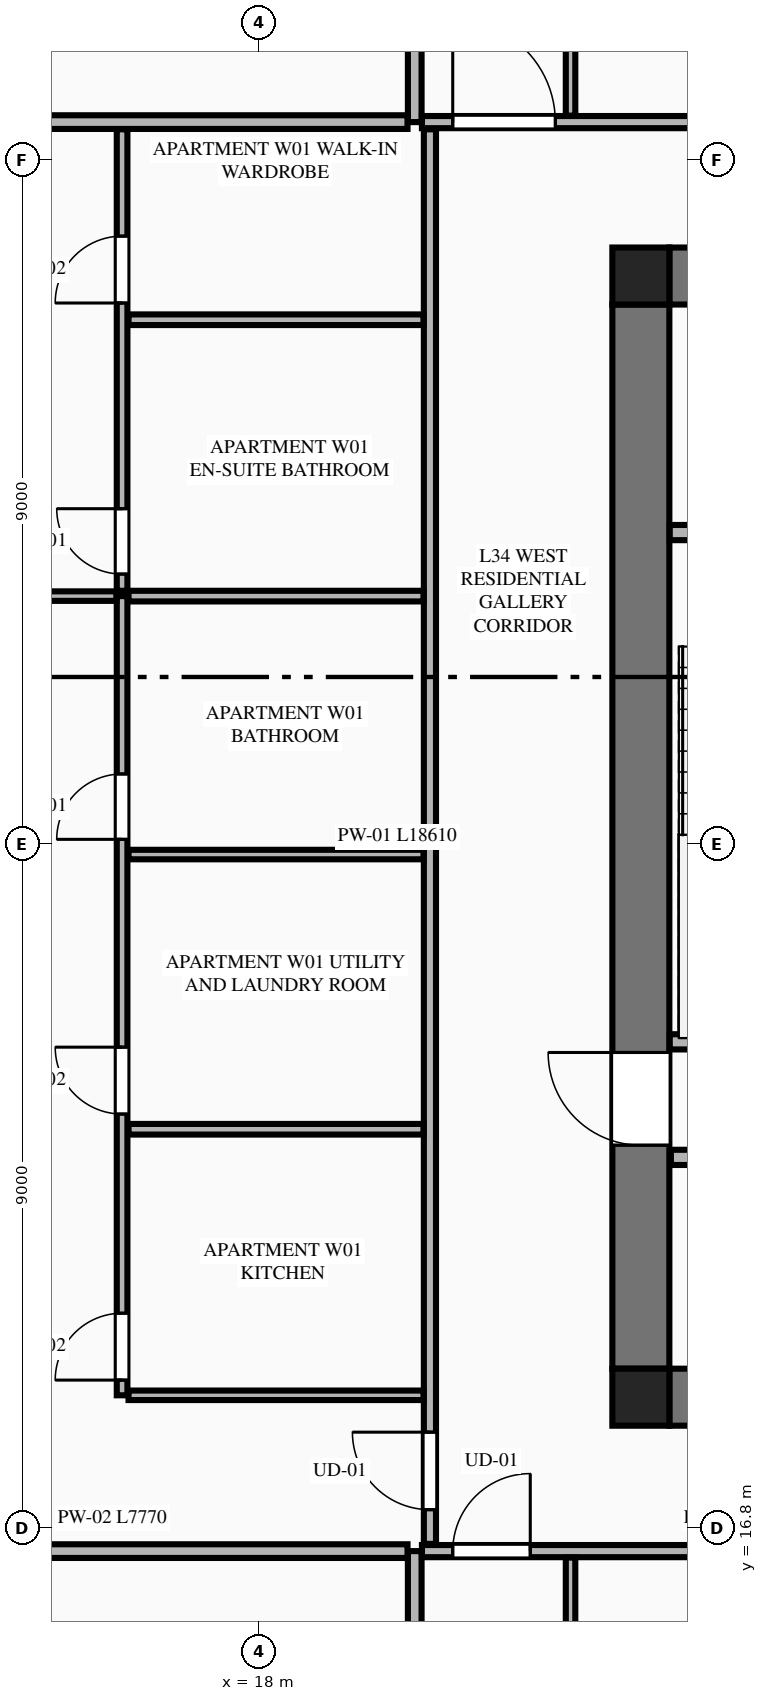
"""IFC4 building model, lengths in metres.
Left out: names, types, materials, properties, quantities, classifications, styles, units other than length and angle.
Written with IfcOpenShell. Run it as: python <this file> out.ifc"""

import sys

from ifc_helpers import new_model, si_unit, direction, frame, frame_2d, origin, origin_2d, place, context, subcontext, project, spatial, rectangle, extrude, element, fill, save


model = new_model("IFC4")
c1 = context("Model", 3, precision=1e-05, world=origin(), true_north=direction((0.0, 1.0)))
c2 = subcontext(c1, "Body", "Model", "MODEL_VIEW")
j1 = project(units=[si_unit("LENGTHUNIT", "METRE"), si_unit("PLANEANGLEUNIT", "RADIAN")], contexts=[c1])
p1 = place(None, origin())
s1 = spatial("IfcSite", under=j1, at=p1, CompositionType="ELEMENT")
p2 = place(p1, origin())
s2 = spatial("IfcBuilding", under=s1, at=p2, CompositionType="ELEMENT")
p3 = place(p2, frame((0.0, 0.0, 130.35)))
s3 = spatial("IfcBuildingStorey", under=s2, at=p3, CompositionType="ELEMENT", Elevation=130.35)
for number, where, z_axis, x_axis in (
    (1, (23.025, 18.525, 0.0), (0.0, 0.0, 1.0), (1.0, 0.0, 0.0)),
    (2, (23.025, 33.275, 0.0), (0.0, 0.0, 1.0), (1.0, 0.0, 0.0)),
):
    element("IfcColumn", number, at=place(p3, frame(where, z_axis=z_axis, x_axis=x_axis)), inside=s3, PredefinedType="COLUMN", context=c2, shape_type="SweptSolid", body=[
        extrude(rectangle(XDim=0.75, YDim=0.75, at=origin_2d()), origin(), (0.0, 0.0, 1.0), 3.55),
    ])
for number, where, z_axis, x_axis in (
    (3, (23.4, 18.525, 0.0), (0.0, 0.0, 1.0), (1.0, 0.0, 0.0)),
    (4, (23.4, 33.275, 0.0), (0.0, 0.0, 1.0), (1.0, 0.0, 0.0)),
):
    element("IfcWall", number, at=place(p3, frame(where, z_axis=z_axis, x_axis=x_axis)), inside=s3, PredefinedType="SHEAR", context=c2, shape_type="SweptSolid", body=[
        extrude(rectangle(XDim=18.0, YDim=0.75, at=frame_2d((9.0, 0.0))), origin(), (0.0, 0.0, 1.0), 3.34),
    ])
p4 = place(p3, frame((23.025, 18.9, 0.0), z_axis=(0.0, 0.0, 1.0), x_axis=(0.0, 1.0, 0.0)))
e5 = element("IfcWall", 5, at=p4, inside=s3, PredefinedType="SHEAR", context=c2, shape_type="SweptSolid", body=[
    extrude(rectangle(XDim=14.0, YDim=0.75, at=frame_2d((7.0, 0.0))), origin(), (0.0, 0.0, 1.0), 3.34),
])
p5 = place(p4, frame((2.94, 0.0, 0.0)))
e6 = element("IfcOpeningElement", 6, at=p5, cuts=e5, PredefinedType="OPENING", context=c2, shape_type="SweptSolid", body=[
    extrude(rectangle(XDim=1.22, YDim=2.25, at=frame_2d((0.61, 1.125))), frame((0.0, 0.385, 0.0), z_axis=(0.0, -1.0, 0.0), x_axis=(1.0, 0.0, 0.0)), (0.0, 0.0, 1.0), 0.77),
])
p6 = place(p3, frame((23.405, 23.2, 0.0), z_axis=(0.0, 0.0, 1.0), x_axis=(1.0, 0.0, 0.0)))
e7 = element("IfcWall", 7, at=p6, inside=s3, PredefinedType="PLUMBINGWALL", context=c2, shape_type="SweptSolid", body=[
    extrude(rectangle(XDim=3.27, YDim=0.2, at=frame_2d((1.635, 0.0))), origin(), (0.0, 0.0, 1.0), 3.34),
])
p7 = place(p3, frame((23.405, 29.9, 0.0), z_axis=(0.0, 0.0, 1.0), x_axis=(1.0, 0.0, 0.0)))
e8 = element("IfcWall", 8, at=p7, inside=s3, PredefinedType="PLUMBINGWALL", context=c2, shape_type="SweptSolid", body=[
    extrude(rectangle(XDim=3.27, YDim=0.2, at=frame_2d((1.635, 0.0))), origin(), (0.0, 0.0, 1.0), 3.34),
])
p8 = place(p7, frame((1.85, 0.0, 0.0)))
e9 = element("IfcOpeningElement", 9, at=p8, cuts=e8, PredefinedType="OPENING", context=c2, shape_type="SweptSolid", body=[
    extrude(rectangle(XDim=0.85, YDim=2.05, at=frame_2d((0.425, 1.025))), frame((0.0, 0.11, 0.0), z_axis=(0.0, -1.0, 0.0), x_axis=(1.0, 0.0, 0.0)), (0.0, 0.0, 1.0), 0.22),
])
p9 = place(p3, frame((23.42, 21.68, 0.0), z_axis=(0.0, 0.0, 1.0), x_axis=(1.0, 0.0, 0.0)))
e10 = element("IfcWall", 10, at=p9, inside=s3, PredefinedType="PLUMBINGWALL", context=c2, shape_type="SweptSolid", body=[
    extrude(rectangle(XDim=17.96, YDim=0.2, at=frame_2d((8.98, 0.0))), origin(), (0.0, 0.0, 1.0), 3.34),
])
p10 = place(p9, frame((11.6, 0.0, 0.0)))
e11 = element("IfcOpeningElement", 11, at=p10, cuts=e10, PredefinedType="OPENING", context=c2, shape_type="SweptSolid", body=[
    extrude(rectangle(XDim=1.1, YDim=2.2, at=frame_2d((0.55, 1.1))), frame((0.0, 0.11, 0.0), z_axis=(0.0, -1.0, 0.0), x_axis=(1.0, 0.0, 0.0)), (0.0, 0.0, 1.0), 0.22),
])
p11 = place(p9, frame((0.41, 0.0, 0.0)))
e12 = element("IfcOpeningElement", 12, at=p11, cuts=e10, PredefinedType="OPENING", context=c2, shape_type="SweptSolid", body=[
    extrude(rectangle(XDim=0.85, YDim=2.05, at=frame_2d((0.425, 1.025))), frame((0.0, 0.11, 0.0), z_axis=(0.0, -1.0, 0.0), x_axis=(1.0, 0.0, 0.0)), (0.0, 0.0, 1.0), 0.22),
])
p12 = place(p9, frame((4.13, 0.0, 0.0)))
e13 = element("IfcOpeningElement", 13, at=p12, cuts=e10, PredefinedType="OPENING", context=c2, shape_type="SweptSolid", body=[
    extrude(rectangle(XDim=0.85, YDim=2.05, at=frame_2d((0.425, 1.025))), frame((0.0, 0.11, 0.0), z_axis=(0.0, -1.0, 0.0), x_axis=(1.0, 0.0, 0.0)), (0.0, 0.0, 1.0), 0.22),
])
p13 = place(p9, frame((7.83, 0.0, 0.0)))
e14 = element("IfcOpeningElement", 14, at=p13, cuts=e10, PredefinedType="OPENING", context=c2, shape_type="SweptSolid", body=[
    extrude(rectangle(XDim=0.85, YDim=2.05, at=frame_2d((0.425, 1.025))), frame((0.0, 0.11, 0.0), z_axis=(0.0, -1.0, 0.0), x_axis=(1.0, 0.0, 0.0)), (0.0, 0.0, 1.0), 0.22),
])
p14 = place(p9, frame((13.78, 0.0, 0.0)))
e15 = element("IfcOpeningElement", 15, at=p14, cuts=e10, PredefinedType="OPENING", context=c2, shape_type="SweptSolid", body=[
    extrude(rectangle(XDim=0.85, YDim=2.05, at=frame_2d((0.425, 1.025))), frame((0.0, 0.11, 0.0), z_axis=(0.0, -1.0, 0.0), x_axis=(1.0, 0.0, 0.0)), (0.0, 0.0, 1.0), 0.22),
])
p15 = place(p9, frame((16.13, 0.0, 0.0)))
e16 = element("IfcOpeningElement", 16, at=p15, cuts=e10, PredefinedType="OPENING", context=c2, shape_type="SweptSolid", body=[
    extrude(rectangle(XDim=0.85, YDim=2.05, at=frame_2d((0.425, 1.025))), frame((0.0, 0.11, 0.0), z_axis=(0.0, -1.0, 0.0), x_axis=(1.0, 0.0, 0.0)), (0.0, 0.0, 1.0), 0.22),
])
p16 = place(p3, frame((20.05, 4.105, 0.0), z_axis=(0.0, 0.0, 1.0), x_axis=(0.0, 1.0, 0.0)))
e17 = element("IfcWall", 17, at=p16, inside=s3, PredefinedType="PARTITIONING", context=c2, shape_type="SweptSolid", body=[
    extrude(rectangle(XDim=12.395, YDim=0.18, at=frame_2d((6.198, 0.0))), origin(), (0.0, 0.0, 1.0), 3.34),
])
p17 = place(p3, frame((20.145, 16.5, 0.0), z_axis=(0.0, 0.0, 1.0), x_axis=(1.0, 0.0, 0.0)))
e18 = element("IfcWall", 18, at=p17, inside=s3, PredefinedType="PARTITIONING", context=c2, shape_type="SweptSolid", body=[
    extrude(rectangle(XDim=8.328, YDim=0.16, at=frame_2d((4.164, 0.0))), origin(), (0.0, 0.0, 1.0), 3.34),
])
p18 = place(p17, frame((0.405, 0.0, 0.0)))
e19 = element("IfcOpeningElement", 19, at=p18, cuts=e18, PredefinedType="OPENING", context=c2, shape_type="SweptSolid", body=[
    extrude(rectangle(XDim=1.02, YDim=2.25, at=frame_2d((0.51, 1.125))), frame((0.0, 0.09, 0.0), z_axis=(0.0, -1.0, 0.0), x_axis=(1.0, 0.0, 0.0)), (0.0, 0.0, 1.0), 0.18),
])
p19 = place(p3, frame((22.1, 10.16, 0.0), z_axis=(0.0, 0.0, 1.0), x_axis=(0.0, 1.0, 0.0)))
e20 = element("IfcWall", 20, at=p19, inside=s3, PredefinedType="PARTITIONING", context=c2, shape_type="SweptSolid", body=[
    extrude(rectangle(XDim=6.255, YDim=0.125, at=frame_2d((3.127, 0.0))), origin(), (0.0, 0.0, 1.0), 2.722),
])
p20 = place(p3, frame((20.05, 35.3, 0.0), z_axis=(0.0, 0.0, 1.0), x_axis=(0.0, 1.0, 0.0)))
e21 = element("IfcWall", 21, at=p20, inside=s3, PredefinedType="PARTITIONING", context=c2, shape_type="SweptSolid", body=[
    extrude(rectangle(XDim=12.195, YDim=0.18, at=frame_2d((6.098, 0.0))), origin(), (0.0, 0.0, 1.0), 3.34),
])
p21 = place(p3, frame((20.145, 35.3, 0.0), z_axis=(0.0, 0.0, 1.0), x_axis=(1.0, 0.0, 0.0)))
e22 = element("IfcWall", 22, at=p21, inside=s3, PredefinedType="PARTITIONING", context=c2, shape_type="SweptSolid", body=[
    extrude(rectangle(XDim=24.51, YDim=0.16, at=frame_2d((12.255, 0.0))), origin(), (0.0, 0.0, 1.0), 3.34),
])
p22 = place(p21, frame((0.405, 0.0, 0.0)))
e23 = element("IfcOpeningElement", 23, at=p22, cuts=e22, PredefinedType="OPENING", context=c2, shape_type="SweptSolid", body=[
    extrude(rectangle(XDim=1.35, YDim=2.35, at=frame_2d((0.675, 1.175))), frame((0.0, 0.09, 0.0), z_axis=(0.0, -1.0, 0.0), x_axis=(1.0, 0.0, 0.0)), (0.0, 0.0, 1.0), 0.18),
])
p23 = place(p3, frame((22.1, 35.385, 0.0), z_axis=(0.0, 0.0, 1.0), x_axis=(0.0, 1.0, 0.0)))
e24 = element("IfcWall", 24, at=p23, inside=s3, PredefinedType="PARTITIONING", context=c2, shape_type="SweptSolid", body=[
    extrude(rectangle(XDim=5.664, YDim=0.125, at=frame_2d((2.832, 0.0))), origin(), (0.0, 0.0, 1.0), 2.722),
])
p24 = place(p3, frame((12.185, 16.5, 0.0), z_axis=(0.0, 0.0, 1.0), x_axis=(1.0, 0.0, 0.0)))
e25 = element("IfcWall", 25, at=p24, inside=s3, PredefinedType="PARTITIONING", context=c2, shape_type="SweptSolid", body=[
    extrude(rectangle(XDim=7.77, YDim=0.18, at=frame_2d((3.885, 0.0))), origin(), (0.0, 0.0, 1.0), 3.34),
])
p25 = place(p3, frame((12.286, 35.3, 0.0), z_axis=(0.0, 0.0, 1.0), x_axis=(1.0, 0.0, 0.0)))
e26 = element("IfcWall", 26, at=p25, inside=s3, PredefinedType="PARTITIONING", context=c2, shape_type="SweptSolid", body=[
    extrude(rectangle(XDim=7.669, YDim=0.18, at=frame_2d((3.834, 0.0))), origin(), (0.0, 0.0, 1.0), 3.34),
])
p26 = place(p3, frame((20.25, 16.595, 0.0), z_axis=(0.0, 0.0, 1.0), x_axis=(0.0, 1.0, 0.0)))
e27 = element("IfcWall", 27, at=p26, inside=s3, PredefinedType="PARTITIONING", context=c2, shape_type="SweptSolid", body=[
    extrude(rectangle(XDim=18.61, YDim=0.16, at=frame_2d((9.305, 0.0))), origin(), (0.0, 0.0, 1.0), 3.34),
])
p27 = place(p26, frame((0.45, 0.0, 0.0)))
e28 = element("IfcOpeningElement", 28, at=p27, cuts=e27, PredefinedType="OPENING", context=c2, shape_type="SweptSolid", body=[
    extrude(rectangle(XDim=1.02, YDim=2.25, at=frame_2d((0.51, 1.125))), frame((0.0, 0.09, 0.0), z_axis=(0.0, -1.0, 0.0), x_axis=(1.0, 0.0, 0.0)), (0.0, 0.0, 1.0), 0.18),
])
p28 = place(p3, frame((16.285, 18.55, 0.0), z_axis=(0.0, 0.0, 1.0), x_axis=(1.0, 0.0, 0.0)))
e29 = element("IfcWall", 29, at=p28, inside=s3, PredefinedType="PARTITIONING", context=c2, shape_type="SweptSolid", body=[
    extrude(rectangle(XDim=3.88, YDim=0.125, at=frame_2d((1.94, 0.0))), origin(), (0.0, 0.0, 1.0), 2.722),
])
p29 = place(p3, frame((16.2, 18.55, 0.0), z_axis=(0.0, 0.0, 1.0), x_axis=(0.0, 1.0, 0.0)))
e30 = element("IfcWall", 30, at=p29, inside=s3, PredefinedType="PLUMBINGWALL", context=c2, shape_type="SweptSolid", body=[
    extrude(rectangle(XDim=10.514, YDim=0.14, at=frame_2d((5.257, 0.0))), origin(), (0.0, 0.0, 1.0), 3.34),
])
p30 = place(p29, frame((0.2, 0.0, 0.0)))
e31 = element("IfcOpeningElement", 31, at=p30, cuts=e30, PredefinedType="OPENING", context=c2, shape_type="SweptSolid", body=[
    extrude(rectangle(XDim=0.88, YDim=2.15, at=frame_2d((0.44, 1.075))), frame((0.0, 0.08, 0.0), z_axis=(0.0, -1.0, 0.0), x_axis=(1.0, 0.0, 0.0)), (0.0, 0.0, 1.0), 0.16),
])
p31 = place(p29, frame((3.7, 0.0, 0.0)))
e32 = element("IfcOpeningElement", 32, at=p31, cuts=e30, PredefinedType="OPENING", context=c2, shape_type="SweptSolid", body=[
    extrude(rectangle(XDim=0.88, YDim=2.15, at=frame_2d((0.44, 1.075))), frame((0.0, 0.08, 0.0), z_axis=(0.0, -1.0, 0.0), x_axis=(1.0, 0.0, 0.0)), (0.0, 0.0, 1.0), 0.16),
])
p32 = place(p29, frame((7.314, 0.0, 0.0)))
e33 = element("IfcOpeningElement", 33, at=p32, cuts=e30, PredefinedType="OPENING", context=c2, shape_type="SweptSolid", body=[
    extrude(rectangle(XDim=0.86, YDim=2.1, at=frame_2d((0.43, 1.05))), frame((0.0, 0.08, 0.0), z_axis=(0.0, -1.0, 0.0), x_axis=(1.0, 0.0, 0.0)), (0.0, 0.0, 1.0), 0.16),
])
p33 = place(p3, frame((16.2, 29.134, 0.0), z_axis=(0.0, 0.0, 1.0), x_axis=(0.0, 1.0, 0.0)))
e34 = element("IfcWall", 34, at=p33, inside=s3, PredefinedType="PLUMBINGWALL", context=c2, shape_type="SweptSolid", body=[
    extrude(rectangle(XDim=6.071, YDim=0.14, at=frame_2d((3.036, 0.0))), origin(), (0.0, 0.0, 1.0), 3.34),
])
p34 = place(p33, frame((0.22, 0.0, 0.0)))
e35 = element("IfcOpeningElement", 35, at=p34, cuts=e34, PredefinedType="OPENING", context=c2, shape_type="SweptSolid", body=[
    extrude(rectangle(XDim=0.86, YDim=2.1, at=frame_2d((0.43, 1.05))), frame((0.0, 0.08, 0.0), z_axis=(0.0, -1.0, 0.0), x_axis=(1.0, 0.0, 0.0)), (0.0, 0.0, 1.0), 0.16),
])
p35 = place(p33, frame((3.786, 0.0, 0.0)))
e36 = element("IfcOpeningElement", 36, at=p35, cuts=e34, PredefinedType="OPENING", context=c2, shape_type="SweptSolid", body=[
    extrude(rectangle(XDim=0.88, YDim=2.15, at=frame_2d((0.44, 1.075))), frame((0.0, 0.08, 0.0), z_axis=(0.0, -1.0, 0.0), x_axis=(1.0, 0.0, 0.0)), (0.0, 0.0, 1.0), 0.16),
])
p36 = place(p3, frame((16.285, 29.064, 0.0), z_axis=(0.0, 0.0, 1.0), x_axis=(1.0, 0.0, 0.0)))
e37 = element("IfcWall", 37, at=p36, inside=s3, PredefinedType="PLUMBINGWALL", context=c2, shape_type="SweptSolid", body=[
    extrude(rectangle(XDim=3.88, YDim=0.14, at=frame_2d((1.94, 0.0))), origin(), (0.0, 0.0, 1.0), 3.34),
])
p37 = place(p3, frame((9.116, 29.064, 0.0), z_axis=(0.0, 0.0, 1.0), x_axis=(1.0, 0.0, 0.0)))
e38 = element("IfcWall", 38, at=p37, inside=s3, PredefinedType="PARTITIONING", context=c2, shape_type="SweptSolid", body=[
    extrude(rectangle(XDim=7.009, YDim=0.125, at=frame_2d((3.504, 0.0))), origin(), (0.0, 0.0, 1.0), 3.34),
])
p38 = place(p37, frame((0.35, 0.0, 0.0)))
e39 = element("IfcOpeningElement", 39, at=p38, cuts=e38, PredefinedType="OPENING", context=c2, shape_type="SweptSolid", body=[
    extrude(rectangle(XDim=0.92, YDim=2.15, at=frame_2d((0.46, 1.075))), frame((0.0, 0.073, 0.0), z_axis=(0.0, -1.0, 0.0), x_axis=(1.0, 0.0, 0.0)), (0.0, 0.0, 1.0), 0.145),
])
p39 = place(p3, frame((16.285, 22.05, 0.0), z_axis=(0.0, 0.0, 1.0), x_axis=(1.0, 0.0, 0.0)))
e40 = element("IfcWall", 40, at=p39, inside=s3, PredefinedType="PLUMBINGWALL", context=c2, shape_type="SweptSolid", body=[
    extrude(rectangle(XDim=3.88, YDim=0.14, at=frame_2d((1.94, 0.0))), origin(), (0.0, 0.0, 1.0), 3.34),
])
p40 = place(p3, frame((16.285, 25.664, 0.0), z_axis=(0.0, 0.0, 1.0), x_axis=(1.0, 0.0, 0.0)))
e41 = element("IfcWall", 41, at=p40, inside=s3, PredefinedType="PARTITIONING", context=c2, shape_type="SweptSolid", body=[
    extrude(rectangle(XDim=3.88, YDim=0.125, at=frame_2d((1.94, 0.0))), origin(), (0.0, 0.0, 1.0), 3.34),
])
p41 = place(p3, frame((16.285, 32.7, 0.0), z_axis=(0.0, 0.0, 1.0), x_axis=(1.0, 0.0, 0.0)))
e42 = element("IfcWall", 42, at=p41, inside=s3, PredefinedType="PLUMBINGWALL", context=c2, shape_type="SweptSolid", body=[
    extrude(rectangle(XDim=3.88, YDim=0.14, at=frame_2d((1.94, 0.0))), origin(), (0.0, 0.0, 1.0), 3.34),
])
p42 = place(p5, origin())
e43 = element("IfcDoor", 43, at=p42, inside=s3, OperationType="SINGLE_SWING_RIGHT", PredefinedType="DOOR", context=c2, shape_type="SweptSolid", body=[
    extrude(rectangle(XDim=1.22, YDim=2.25, at=frame_2d((0.61, 1.125))), frame((0.0, 0.025, 0.0), z_axis=(0.0, -1.0, 0.0), x_axis=(1.0, 0.0, 0.0)), (0.0, 0.0, 1.0), 0.05),
])
fill(e6, e43)
p43 = place(p18, origin())
e44 = element("IfcDoor", 44, at=p43, inside=s3, OperationType="SINGLE_SWING_RIGHT", PredefinedType="DOOR", context=c2, shape_type="SweptSolid", body=[
    extrude(rectangle(XDim=1.02, YDim=2.25, at=frame_2d((0.51, 1.125))), frame((0.0, 0.025, 0.0), z_axis=(0.0, -1.0, 0.0), x_axis=(1.0, 0.0, 0.0)), (0.0, 0.0, 1.0), 0.05),
])
fill(e19, e44)
p44 = place(p22, origin())
e45 = element("IfcDoor", 45, at=p44, inside=s3, OperationType="SINGLE_SWING_LEFT", PredefinedType="DOOR", context=c2, shape_type="SweptSolid", body=[
    extrude(rectangle(XDim=1.35, YDim=2.35, at=frame_2d((0.675, 1.175))), frame((0.0, 0.025, 0.0), z_axis=(0.0, -1.0, 0.0), x_axis=(1.0, 0.0, 0.0)), (0.0, 0.0, 1.0), 0.05),
])
fill(e23, e45)
p45 = place(p30, origin())
e46 = element("IfcDoor", 46, at=p45, inside=s3, OperationType="SINGLE_SWING_LEFT", PredefinedType="DOOR", context=c2, shape_type="SweptSolid", body=[
    extrude(rectangle(XDim=0.88, YDim=2.15, at=frame_2d((0.44, 1.075))), frame((0.0, 0.025, 0.0), z_axis=(0.0, -1.0, 0.0), x_axis=(1.0, 0.0, 0.0)), (0.0, 0.0, 1.0), 0.05),
])
fill(e31, e46)
p46 = place(p31, origin())
e47 = element("IfcDoor", 47, at=p46, inside=s3, OperationType="SINGLE_SWING_RIGHT", PredefinedType="DOOR", context=c2, shape_type="SweptSolid", body=[
    extrude(rectangle(XDim=0.88, YDim=2.15, at=frame_2d((0.44, 1.075))), frame((0.0, 0.025, 0.0), z_axis=(0.0, -1.0, 0.0), x_axis=(1.0, 0.0, 0.0)), (0.0, 0.0, 1.0), 0.05),
])
fill(e32, e47)
p47 = place(p32, origin())
e48 = element("IfcDoor", 48, at=p47, inside=s3, OperationType="SINGLE_SWING_LEFT", PredefinedType="DOOR", context=c2, shape_type="SweptSolid", body=[
    extrude(rectangle(XDim=0.86, YDim=2.1, at=frame_2d((0.43, 1.05))), frame((0.0, 0.025, 0.0), z_axis=(0.0, -1.0, 0.0), x_axis=(1.0, 0.0, 0.0)), (0.0, 0.0, 1.0), 0.05),
])
fill(e33, e48)
p48 = place(p34, origin())
e49 = element("IfcDoor", 49, at=p48, inside=s3, OperationType="SINGLE_SWING_RIGHT", PredefinedType="DOOR", context=c2, shape_type="SweptSolid", body=[
    extrude(rectangle(XDim=0.86, YDim=2.1, at=frame_2d((0.43, 1.05))), frame((0.0, 0.025, 0.0), z_axis=(0.0, -1.0, 0.0), x_axis=(1.0, 0.0, 0.0)), (0.0, 0.0, 1.0), 0.05),
])
fill(e35, e49)
p49 = place(p35, origin())
e50 = element("IfcDoor", 50, at=p49, inside=s3, OperationType="SINGLE_SWING_LEFT", PredefinedType="DOOR", context=c2, shape_type="SweptSolid", body=[
    extrude(rectangle(XDim=0.88, YDim=2.15, at=frame_2d((0.44, 1.075))), frame((0.0, 0.025, 0.0), z_axis=(0.0, -1.0, 0.0), x_axis=(1.0, 0.0, 0.0)), (0.0, 0.0, 1.0), 0.05),
])
fill(e36, e50)
p50 = place(p27, origin())
e51 = element("IfcDoor", 51, at=p50, inside=s3, OperationType="SINGLE_SWING_RIGHT", PredefinedType="DOOR", context=c2, shape_type="SweptSolid", body=[
    extrude(rectangle(XDim=1.02, YDim=2.25, at=frame_2d((0.51, 1.125))), frame((0.0, 0.025, 0.0), z_axis=(0.0, -1.0, 0.0), x_axis=(1.0, 0.0, 0.0)), (0.0, 0.0, 1.0), 0.05),
])
fill(e28, e51)
save(model, sys.argv[1])
